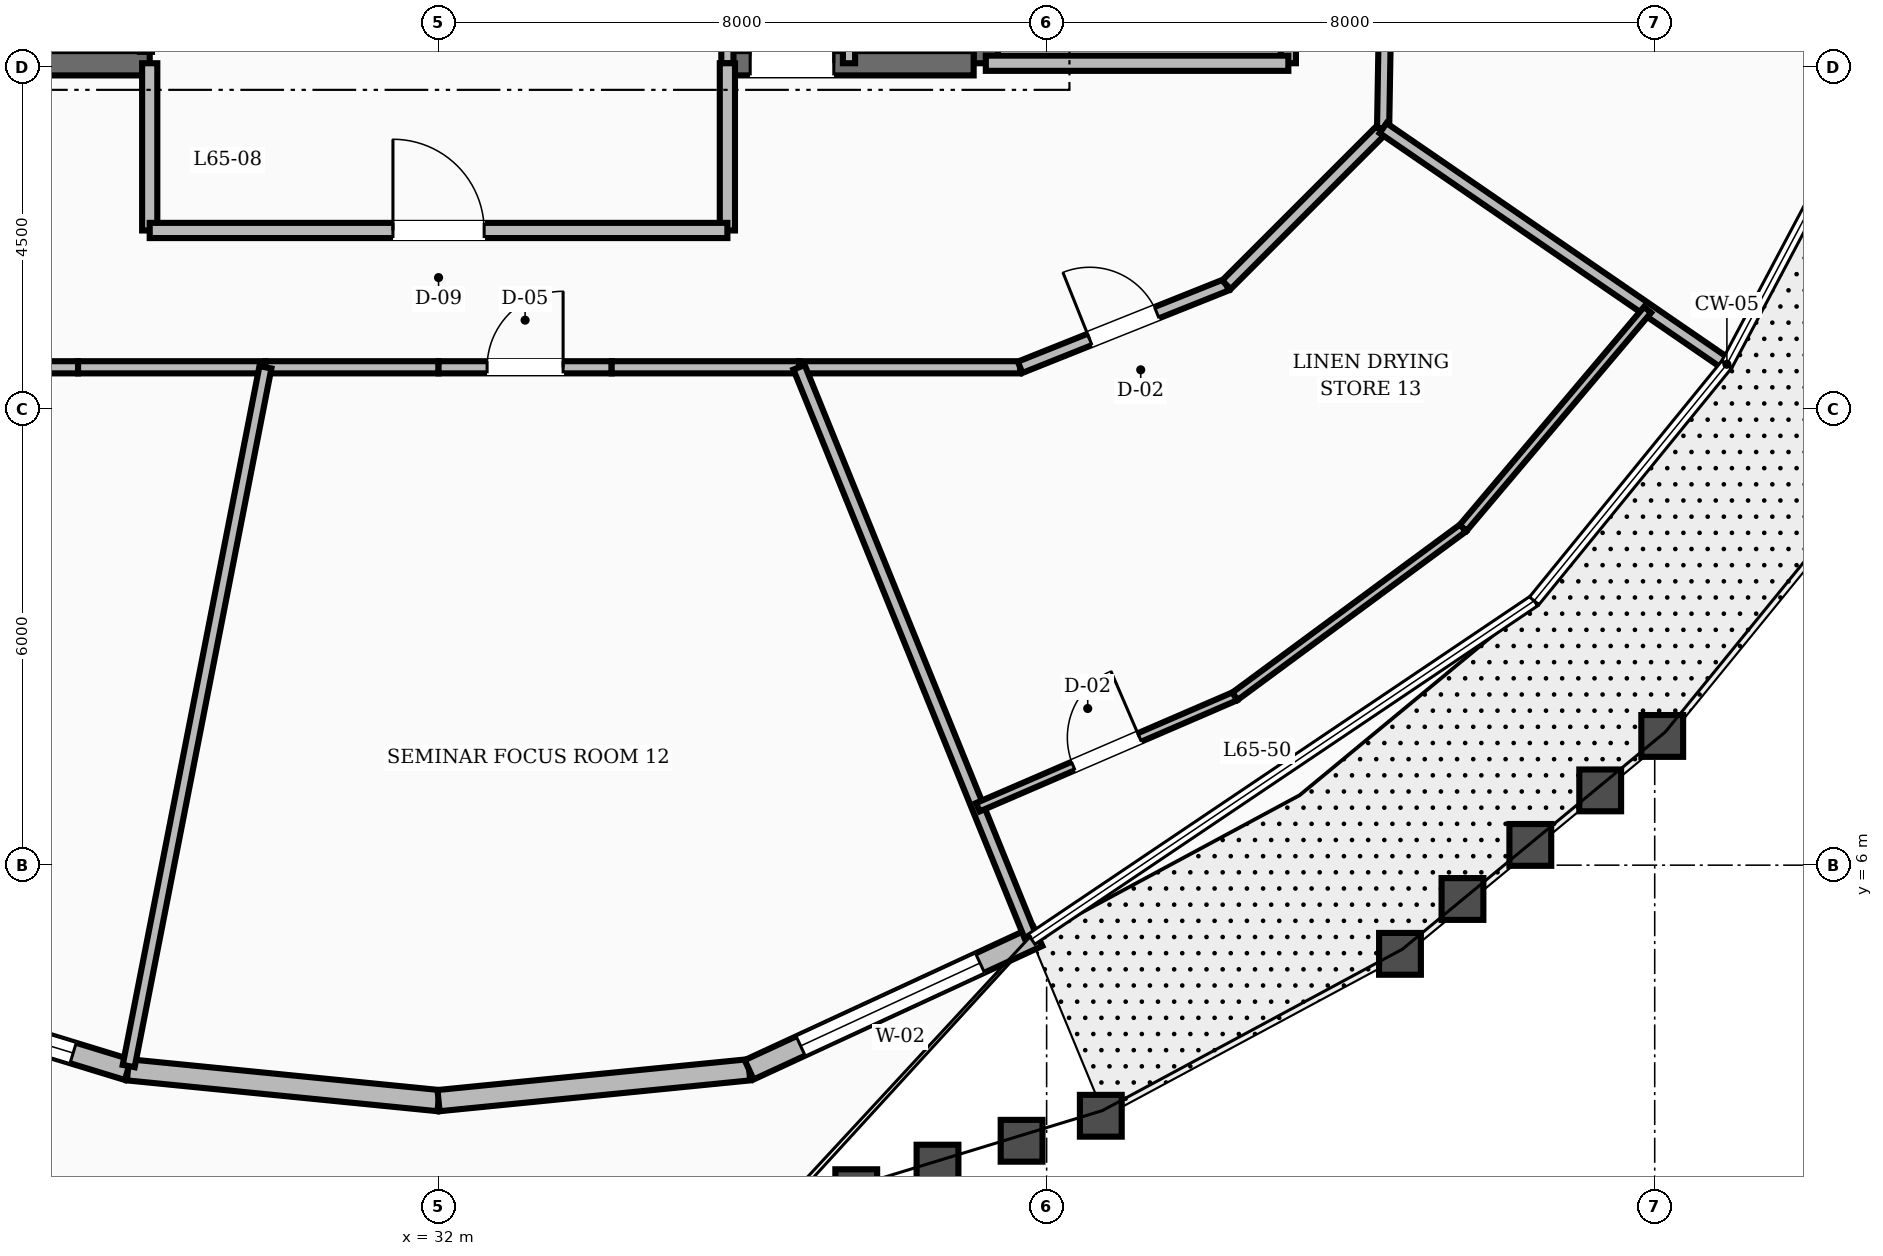
"""IFC4 building model, lengths in metres.
Left out: names, types, materials, properties, quantities, classifications, styles, units other than length and angle.
Written with IfcOpenShell. Run it as: python <this file> out.ifc"""

import sys

from ifc_helpers import new_model, si_unit, direction, frame, frame_2d, origin, place, context, subcontext, project, spatial, rectangle, extrude, element, fill, save


model = new_model("IFC4")
c1 = context("Model", 3, precision=1e-05, world=origin(), true_north=direction((0.0, 1.0)))
c2 = subcontext(c1, "Body", "Model", "MODEL_VIEW")
j1 = project(units=[si_unit("LENGTHUNIT", "METRE"), si_unit("PLANEANGLEUNIT", "RADIAN")], contexts=[c1])
p1 = place(None, origin())
s1 = spatial("IfcSite", under=j1, at=p1, CompositionType="ELEMENT")
p2 = place(p1, origin())
s2 = spatial("IfcBuilding", under=s1, at=p2, CompositionType="ELEMENT")
p3 = place(p2, frame((0.0, 0.0, 250.8)))
s3 = spatial("IfcBuildingStorey", under=s2, at=p3, CompositionType="ELEMENT", Elevation=250.8)
p4 = place(p3, frame((39.2, 16.55, 0.0), z_axis=(0.0, 0.0, 1.0), x_axis=(0.0, 1.0, 0.0)))
e1 = element("IfcWall", 1, at=p4, inside=s3, PredefinedType="SHEAR", context=c2, shape_type="SweptSolid", body=[
    extrude(rectangle(XDim=6.3, YDim=0.32, at=frame_2d((3.15, 0.0))), origin(), (0.0, 0.0, 1.0), 3.6),
])
p5 = place(p3, frame((24.96, 16.55, 0.0), z_axis=(0.0, 0.0, 1.0), x_axis=(1.0, 0.0, 0.0)))
e2 = element("IfcWall", 2, at=p5, inside=s3, PredefinedType="SHEAR", context=c2, shape_type="SweptSolid", body=[
    extrude(rectangle(XDim=3.24, YDim=0.32, at=frame_2d((1.62, 0.0))), origin(), (0.0, 0.0, 1.0), 3.6),
])
p6 = place(p3, frame((35.8, 16.55, 0.0), z_axis=(0.0, 0.0, 1.0), x_axis=(1.0, 0.0, 0.0)))
e3 = element("IfcWall", 3, at=p6, inside=s3, PredefinedType="SHEAR", context=c2, shape_type="SweptSolid", body=[
    extrude(rectangle(XDim=3.24, YDim=0.32, at=frame_2d((1.62, 0.0))), origin(), (0.0, 0.0, 1.0), 3.6),
])
p7 = place(p6, frame((0.3, 0.0, 0.0)))
e4 = element("IfcOpeningElement", 4, at=p7, cuts=e3, PredefinedType="OPENING", context=c2, shape_type="SweptSolid", body=[
    extrude(rectangle(XDim=1.1, YDim=2.1, at=frame_2d((0.55, 1.05))), frame((0.0, 0.17, 0.0), z_axis=(0.0, -1.0, 0.0), x_axis=(1.0, 0.0, 0.0)), (0.0, 0.0, 1.0), 0.34),
])
p8 = place(p3, frame((23.985, 4.508, 0.0), z_axis=(0.0, 0.0, 1.0), x_axis=(0.956361719018, -0.292185322009, 0.0)))
e5 = element("IfcWall", 5, at=p8, inside=s3, PredefinedType="STANDARD", context=c2, shape_type="SweptSolid", body=[
    extrude(rectangle(XDim=4.108, YDim=0.28, at=frame_2d((2.054, 0.0))), origin(), (0.0, 0.0, 1.0), 2.88),
])
p9 = place(p8, frame((0.754, 0.0, 0.8)))
e6 = element("IfcOpeningElement", 6, at=p9, cuts=e5, PredefinedType="OPENING", context=c2, shape_type="SweptSolid", body=[
    extrude(rectangle(XDim=2.6, YDim=1.65, at=frame_2d((1.3, 0.825))), frame((0.0, 0.15, 0.0), z_axis=(0.0, -1.0, 0.0), x_axis=(1.0, 0.0, 0.0)), (0.0, 0.0, 1.0), 0.3),
])
for number, where, z_axis, x_axis in (
    (7, (27.914, 3.308, 0.0), (0.0, 0.0, 1.0), (0.995, -0.099, 0.0)),
    (8, (32.0, 2.902, 0.0), (0.0, 0.0, 1.0), (0.995, 0.099, 0.0)),
):
    element("IfcWall", number, at=place(p3, frame(where, z_axis=z_axis, x_axis=x_axis)), inside=s3, PredefinedType="STANDARD", context=c2, shape_type="SweptSolid", body=[
        extrude(rectangle(XDim=4.106, YDim=0.28, at=frame_2d((2.053, 0.0))), origin(), (0.0, 0.0, 1.0), 2.88),
    ])
p10 = place(p3, frame((36.086, 3.308, 0.0), z_axis=(0.0, 0.0, 1.0), x_axis=(0.90766204645, 0.41970181014, 0.0)))
e9 = element("IfcWall", 9, at=p10, inside=s3, PredefinedType="STANDARD", context=c2, shape_type="SweptSolid", body=[
    extrude(rectangle(XDim=4.185, YDim=0.28, at=frame_2d((2.092, 0.0))), origin(), (0.0, 0.0, 1.0), 2.88),
])
p11 = place(p10, frame((0.746, 0.0, 0.8)))
e10 = element("IfcOpeningElement", 10, at=p11, cuts=e9, PredefinedType="OPENING", context=c2, shape_type="SweptSolid", body=[
    extrude(rectangle(XDim=2.6, YDim=1.65, at=frame_2d((1.3, 0.825))), frame((0.0, 0.15, 0.0), z_axis=(0.0, -1.0, 0.0), x_axis=(1.0, 0.0, 0.0)), (0.0, 0.0, 1.0), 0.3),
])
p12 = place(p3, frame((43.18, 16.55, 0.0), z_axis=(0.0, 0.0, 1.0), x_axis=(0.0, 1.0, 0.0)))
e11 = element("IfcWall", 11, at=p12, inside=s3, PredefinedType="SOLIDWALL", context=c2, shape_type="SweptSolid", body=[
    extrude(rectangle(XDim=2.73, YDim=0.2, at=frame_2d((1.365, 0.0))), origin(), (0.0, 0.0, 1.0), 2.87),
])
p13 = place(p12, frame((0.89, 0.0, 0.0)))
e12 = element("IfcOpeningElement", 12, at=p13, cuts=e11, PredefinedType="OPENING", context=c2, shape_type="SweptSolid", body=[
    extrude(rectangle(XDim=0.95, YDim=2.1, at=frame_2d((0.475, 1.05))), frame((0.0, 0.11, 0.0), z_axis=(0.0, -1.0, 0.0), x_axis=(1.0, 0.0, 0.0)), (0.0, 0.0, 1.0), 0.22),
])
p14 = place(p3, frame((39.2, 16.55, 0.0), z_axis=(0.0, 0.0, 1.0), x_axis=(1.0, 0.0, 0.0)))
e13 = element("IfcWall", 13, at=p14, inside=s3, PredefinedType="SOLIDWALL", context=c2, shape_type="SweptSolid", body=[
    extrude(rectangle(XDim=3.98, YDim=0.2, at=frame_2d((1.99, 0.0))), origin(), (0.0, 0.0, 1.0), 2.87),
])
p15 = place(p3, frame((35.8, 16.55, 0.0), z_axis=(0.0, 0.0, 1.0), x_axis=(0.0, 1.0, 0.0)))
e14 = element("IfcWall", 14, at=p15, inside=s3, PredefinedType="SOLIDWALL", context=c2, shape_type="SweptSolid", body=[
    extrude(rectangle(XDim=3.3, YDim=0.16, at=frame_2d((1.65, 0.0))), origin(), (0.0, 0.0, 1.0), 2.87),
])
p16 = place(p3, frame((37.4, 16.55, 0.0), z_axis=(0.0, 0.0, 1.0), x_axis=(0.0, 1.0, 0.0)))
e15 = element("IfcWall", 15, at=p16, inside=s3, PredefinedType="SOLIDWALL", context=c2, shape_type="SweptSolid", body=[
    extrude(rectangle(XDim=1.75, YDim=0.16, at=frame_2d((0.875, 0.0))), origin(), (0.0, 0.0, 1.0), 2.87),
])
for number, where, z_axis, x_axis in (
    (16, (28.2, 14.35, 0.0), (0.0, 0.0, 1.0), (0.0, 1.0, 0.0)),
    (17, (35.8, 14.35, 0.0), (0.0, 0.0, 1.0), (0.0, 1.0, 0.0)),
):
    element("IfcWall", number, at=place(p3, frame(where, z_axis=z_axis, x_axis=x_axis)), inside=s3, PredefinedType="SOLIDWALL", context=c2, shape_type="SweptSolid", body=[
        extrude(rectangle(XDim=2.2, YDim=0.2, at=frame_2d((1.1, 0.0))), origin(), (0.0, 0.0, 1.0), 2.87),
    ])
p17 = place(p3, frame((28.2, 14.35, 0.0), z_axis=(0.0, 0.0, 1.0), x_axis=(1.0, 0.0, 0.0)))
e18 = element("IfcWall", 18, at=p17, inside=s3, PredefinedType="SOLIDWALL", context=c2, shape_type="SweptSolid", body=[
    extrude(rectangle(XDim=7.6, YDim=0.2, at=frame_2d((3.8, 0.0))), origin(), (0.0, 0.0, 1.0), 2.87),
])
p18 = place(p17, frame((3.2, 0.0, 0.0)))
e19 = element("IfcOpeningElement", 19, at=p18, cuts=e18, PredefinedType="OPENING", context=c2, shape_type="SweptSolid", body=[
    extrude(rectangle(XDim=1.2, YDim=2.1, at=frame_2d((0.6, 1.05))), frame((0.0, 0.11, 0.0), z_axis=(0.0, -1.0, 0.0), x_axis=(1.0, 0.0, 0.0)), (0.0, 0.0, 1.0), 0.22),
])
p19 = place(p3, frame((24.349, 12.55, 0.0), z_axis=(0.0, 0.0, 1.0), x_axis=(1.0, 0.0, 0.0)))
e20 = element("IfcWall", 20, at=p19, inside=s3, PredefinedType="SOLIDWALL", context=c2, shape_type="SweptSolid", body=[
    extrude(rectangle(XDim=2.908, YDim=0.16, at=frame_2d((1.454, 0.0))), origin(), (0.0, 0.0, 1.0), 2.87),
])
p20 = place(p19, frame((0.954, 0.0, 0.0)))
e21 = element("IfcOpeningElement", 21, at=p20, cuts=e20, PredefinedType="OPENING", context=c2, shape_type="SweptSolid", body=[
    extrude(rectangle(XDim=1.0, YDim=2.1, at=frame_2d((0.5, 1.05))), frame((0.0, 0.09, 0.0), z_axis=(0.0, -1.0, 0.0), x_axis=(1.0, 0.0, 0.0)), (0.0, 0.0, 1.0), 0.18),
])
p21 = place(p3, frame((27.257, 12.55, 0.0), z_axis=(0.0, 0.0, 1.0), x_axis=(1.0, 0.0, 0.0)))
e22 = element("IfcWall", 22, at=p21, inside=s3, PredefinedType="SOLIDWALL", context=c2, shape_type="SweptSolid", body=[
    extrude(rectangle(XDim=2.465, YDim=0.16, at=frame_2d((1.232, 0.0))), origin(), (0.0, 0.0, 1.0), 2.87),
])
p22 = place(p3, frame((29.722, 12.55, 0.0), z_axis=(0.0, 0.0, 1.0), x_axis=(1.0, 0.0, 0.0)))
e23 = element("IfcWall", 23, at=p22, inside=s3, PredefinedType="SOLIDWALL", context=c2, shape_type="SweptSolid", body=[
    extrude(rectangle(XDim=2.278, YDim=0.16, at=frame_2d((1.139, 0.0))), origin(), (0.0, 0.0, 1.0), 2.87),
])
p23 = place(p3, frame((32.0, 12.55, 0.0), z_axis=(0.0, 0.0, 1.0), x_axis=(1.0, 0.0, 0.0)))
e24 = element("IfcWall", 24, at=p23, inside=s3, PredefinedType="SOLIDWALL", context=c2, shape_type="SweptSolid", body=[
    extrude(rectangle(XDim=2.278, YDim=0.16, at=frame_2d((1.139, 0.0))), origin(), (0.0, 0.0, 1.0), 2.87),
])
p24 = place(p23, frame((0.639, 0.0, 0.0)))
e25 = element("IfcOpeningElement", 25, at=p24, cuts=e24, PredefinedType="OPENING", context=c2, shape_type="SweptSolid", body=[
    extrude(rectangle(XDim=1.0, YDim=2.1, at=frame_2d((0.5, 1.05))), frame((0.0, 0.09, 0.0), z_axis=(0.0, -1.0, 0.0), x_axis=(1.0, 0.0, 0.0)), (0.0, 0.0, 1.0), 0.18),
])
p25 = place(p3, frame((34.278, 12.55, 0.0), z_axis=(0.0, 0.0, 1.0), x_axis=(1.0, 0.0, 0.0)))
e26 = element("IfcWall", 26, at=p25, inside=s3, PredefinedType="SOLIDWALL", context=c2, shape_type="SweptSolid", body=[
    extrude(rectangle(XDim=2.465, YDim=0.16, at=frame_2d((1.232, 0.0))), origin(), (0.0, 0.0, 1.0), 2.87),
])
p26 = place(p3, frame((36.743, 12.55, 0.0), z_axis=(0.0, 0.0, 1.0), x_axis=(1.0, 0.0, 0.0)))
e27 = element("IfcWall", 27, at=p26, inside=s3, PredefinedType="SOLIDWALL", context=c2, shape_type="SweptSolid", body=[
    extrude(rectangle(XDim=2.908, YDim=0.16, at=frame_2d((1.454, 0.0))), origin(), (0.0, 0.0, 1.0), 2.87),
])
p27 = place(p3, frame((39.651, 12.55, 0.0), z_axis=(0.0, 0.0, 1.0), x_axis=(0.92856882165, 0.371160266542, 0.0)))
e28 = element("IfcWall", 28, at=p27, inside=s3, PredefinedType="SOLIDWALL", context=c2, shape_type="SweptSolid", body=[
    extrude(rectangle(XDim=2.923, YDim=0.16, at=frame_2d((1.461, 0.0))), origin(), (0.0, 0.0, 1.0), 2.87),
])
p28 = place(p27, frame((0.987, 0.0, 0.0)))
e29 = element("IfcOpeningElement", 29, at=p28, cuts=e28, PredefinedType="OPENING", context=c2, shape_type="SweptSolid", body=[
    extrude(rectangle(XDim=0.95, YDim=2.1, at=frame_2d((0.475, 1.05))), frame((0.0, 0.09, 0.0), z_axis=(0.0, -1.0, 0.0), x_axis=(1.0, 0.0, 0.0)), (0.0, 0.0, 1.0), 0.18),
])
p29 = place(p3, frame((42.365, 13.635, 0.0), z_axis=(0.0, 0.0, 1.0), x_axis=(0.707106781187, 0.707106781187, 0.0)))
e30 = element("IfcWall", 30, at=p29, inside=s3, PredefinedType="SOLIDWALL", context=c2, shape_type="SweptSolid", body=[
    extrude(rectangle(XDim=2.916, YDim=0.16, at=frame_2d((1.458, 0.0))), origin(), (0.0, 0.0, 1.0), 2.87),
])
p30 = place(p3, frame((44.427, 15.697, 0.0), z_axis=(0.0, 0.0, 1.0), x_axis=(0.016981035134, 0.999855811828, 0.0)))
e31 = element("IfcWall", 31, at=p30, inside=s3, PredefinedType="SOLIDWALL", context=c2, shape_type="SweptSolid", body=[
    extrude(rectangle(XDim=3.134, YDim=0.16, at=frame_2d((1.567, 0.0))), origin(), (0.0, 0.0, 1.0), 2.87),
])
p31 = place(p3, frame((44.427, 15.697, 0.0), z_axis=(0.0, 0.0, 1.0), x_axis=(0.824260654359, -0.566210538294, 0.0)))
e32 = element("IfcWall", 32, at=p31, inside=s3, PredefinedType="SOLIDWALL", context=c2, shape_type="SweptSolid", body=[
    extrude(rectangle(XDim=5.437, YDim=0.16, at=frame_2d((2.719, 0.0))), origin(), (0.0, 0.0, 1.0), 2.87),
])
p32 = place(p3, frame((29.722, 12.55, 0.0), z_axis=(0.0, 0.0, 1.0), x_axis=(-0.192054715532, -0.981384219479, 0.0)))
e33 = element("IfcWall", 33, at=p32, inside=s3, PredefinedType="SOLIDWALL", context=c2, shape_type="SweptSolid", body=[
    extrude(rectangle(XDim=9.367, YDim=0.16, at=frame_2d((4.684, 0.0))), origin(), (0.0, 0.0, 1.0), 2.87),
])
p33 = place(p3, frame((36.743, 12.55, 0.0), z_axis=(0.0, 0.0, 1.0), x_axis=(0.376547405106, -0.926397350875, 0.0)))
e34 = element("IfcWall", 34, at=p33, inside=s3, PredefinedType="SOLIDWALL", context=c2, shape_type="SweptSolid", body=[
    extrude(rectangle(XDim=8.072, YDim=0.16, at=frame_2d((4.036, 0.0))), origin(), (0.0, 0.0, 1.0), 2.87),
])
p34 = place(p3, frame((39.095, 6.762, 0.0), z_axis=(0.0, 0.0, 1.0), x_axis=(0.918134155299, 0.396269697144, 0.0)))
e35 = element("IfcWall", 35, at=p34, inside=s3, PredefinedType="PARTITIONING", context=c2, shape_type="SweptSolid", body=[
    extrude(rectangle(XDim=3.684, YDim=0.12, at=frame_2d((1.842, 0.0))), origin(), (0.0, 0.0, 1.0), 2.87),
])
p35 = place(p34, frame((1.367, 0.0, 0.0)))
e36 = element("IfcOpeningElement", 36, at=p35, cuts=e35, PredefinedType="OPENING", context=c2, shape_type="SweptSolid", body=[
    extrude(rectangle(XDim=0.95, YDim=2.1, at=frame_2d((0.475, 1.05))), frame((0.0, 0.07, 0.0), z_axis=(0.0, -1.0, 0.0), x_axis=(1.0, 0.0, 0.0)), (0.0, 0.0, 1.0), 0.14),
])
p36 = place(p3, frame((42.477, 8.222, 0.0), z_axis=(0.0, 0.0, 1.0), x_axis=(0.80472515512, 0.593647559346, 0.0)))
e37 = element("IfcWall", 37, at=p36, inside=s3, PredefinedType="PARTITIONING", context=c2, shape_type="SweptSolid", body=[
    extrude(rectangle(XDim=3.731, YDim=0.12, at=frame_2d((1.866, 0.0))), origin(), (0.0, 0.0, 1.0), 2.87),
])
p37 = place(p3, frame((45.48, 10.437, 0.0), z_axis=(0.0, 0.0, 1.0), x_axis=(0.645581040063, 0.76369177075, 0.0)))
e38 = element("IfcWall", 38, at=p37, inside=s3, PredefinedType="PARTITIONING", context=c2, shape_type="SweptSolid", body=[
    extrude(rectangle(XDim=3.758, YDim=0.12, at=frame_2d((1.879, 0.0))), origin(), (0.0, 0.0, 1.0), 2.87),
])
p38 = place(p9, origin())
e39 = element("IfcWindow", 39, at=p38, inside=s3, PartitioningType="SINGLE_PANEL", PredefinedType="WINDOW", context=c2, shape_type="SweptSolid", body=[
    extrude(rectangle(XDim=2.6, YDim=1.65, at=frame_2d((1.3, 0.825))), frame((0.0, 0.03, 0.0), z_axis=(0.0, -1.0, 0.0), x_axis=(1.0, 0.0, 0.0)), (0.0, 0.0, 1.0), 0.06),
])
fill(e6, e39)
p39 = place(p11, origin())
e40 = element("IfcWindow", 40, at=p39, inside=s3, PartitioningType="SINGLE_PANEL", PredefinedType="WINDOW", context=c2, shape_type="SweptSolid", body=[
    extrude(rectangle(XDim=2.6, YDim=1.65, at=frame_2d((1.3, 0.825))), frame((0.0, 0.03, 0.0), z_axis=(0.0, -1.0, 0.0), x_axis=(1.0, 0.0, 0.0)), (0.0, 0.0, 1.0), 0.06),
])
fill(e10, e40)
p40 = place(p7, origin())
e41 = element("IfcDoor", 41, at=p40, inside=s3, OperationType="SINGLE_SWING_RIGHT", PredefinedType="DOOR", context=c2, shape_type="SweptSolid", body=[
    extrude(rectangle(XDim=1.1, YDim=2.1, at=frame_2d((0.55, 1.05))), frame((0.0, 0.025, 0.0), z_axis=(0.0, -1.0, 0.0), x_axis=(1.0, 0.0, 0.0)), (0.0, 0.0, 1.0), 0.05),
])
fill(e4, e41)
p41 = place(p18, origin())
e42 = element("IfcDoor", 42, at=p41, inside=s3, OperationType="SINGLE_SWING_LEFT", PredefinedType="DOOR", context=c2, shape_type="SweptSolid", body=[
    extrude(rectangle(XDim=1.2, YDim=2.1, at=frame_2d((0.6, 1.05))), frame((0.0, 0.025, 0.0), z_axis=(0.0, -1.0, 0.0), x_axis=(1.0, 0.0, 0.0)), (0.0, 0.0, 1.0), 0.05),
])
fill(e19, e42)
p42 = place(p24, origin())
e43 = element("IfcDoor", 43, at=p42, inside=s3, OperationType="SINGLE_SWING_RIGHT", PredefinedType="DOOR", context=c2, shape_type="SweptSolid", body=[
    extrude(rectangle(XDim=1.0, YDim=2.1, at=frame_2d((0.5, 1.05))), frame((0.0, 0.025, 0.0), z_axis=(0.0, -1.0, 0.0), x_axis=(1.0, 0.0, 0.0)), (0.0, 0.0, 1.0), 0.05),
])
fill(e25, e43)
p43 = place(p28, origin())
e44 = element("IfcDoor", 44, at=p43, inside=s3, OperationType="SINGLE_SWING_LEFT", PredefinedType="DOOR", context=c2, shape_type="SweptSolid", body=[
    extrude(rectangle(XDim=0.95, YDim=2.1, at=frame_2d((0.475, 1.05))), frame((0.0, 0.025, 0.0), z_axis=(0.0, -1.0, 0.0), x_axis=(1.0, 0.0, 0.0)), (0.0, 0.0, 1.0), 0.05),
])
fill(e29, e44)
p44 = place(p35, origin())
e45 = element("IfcDoor", 45, at=p44, inside=s3, OperationType="SINGLE_SWING_RIGHT", PredefinedType="DOOR", context=c2, shape_type="SweptSolid", body=[
    extrude(rectangle(XDim=0.95, YDim=2.1, at=frame_2d((0.475, 1.05))), frame((0.0, 0.025, 0.0), z_axis=(0.0, -1.0, 0.0), x_axis=(1.0, 0.0, 0.0)), (0.0, 0.0, 1.0), 0.05),
])
fill(e36, e45)
save(model, sys.argv[1])
